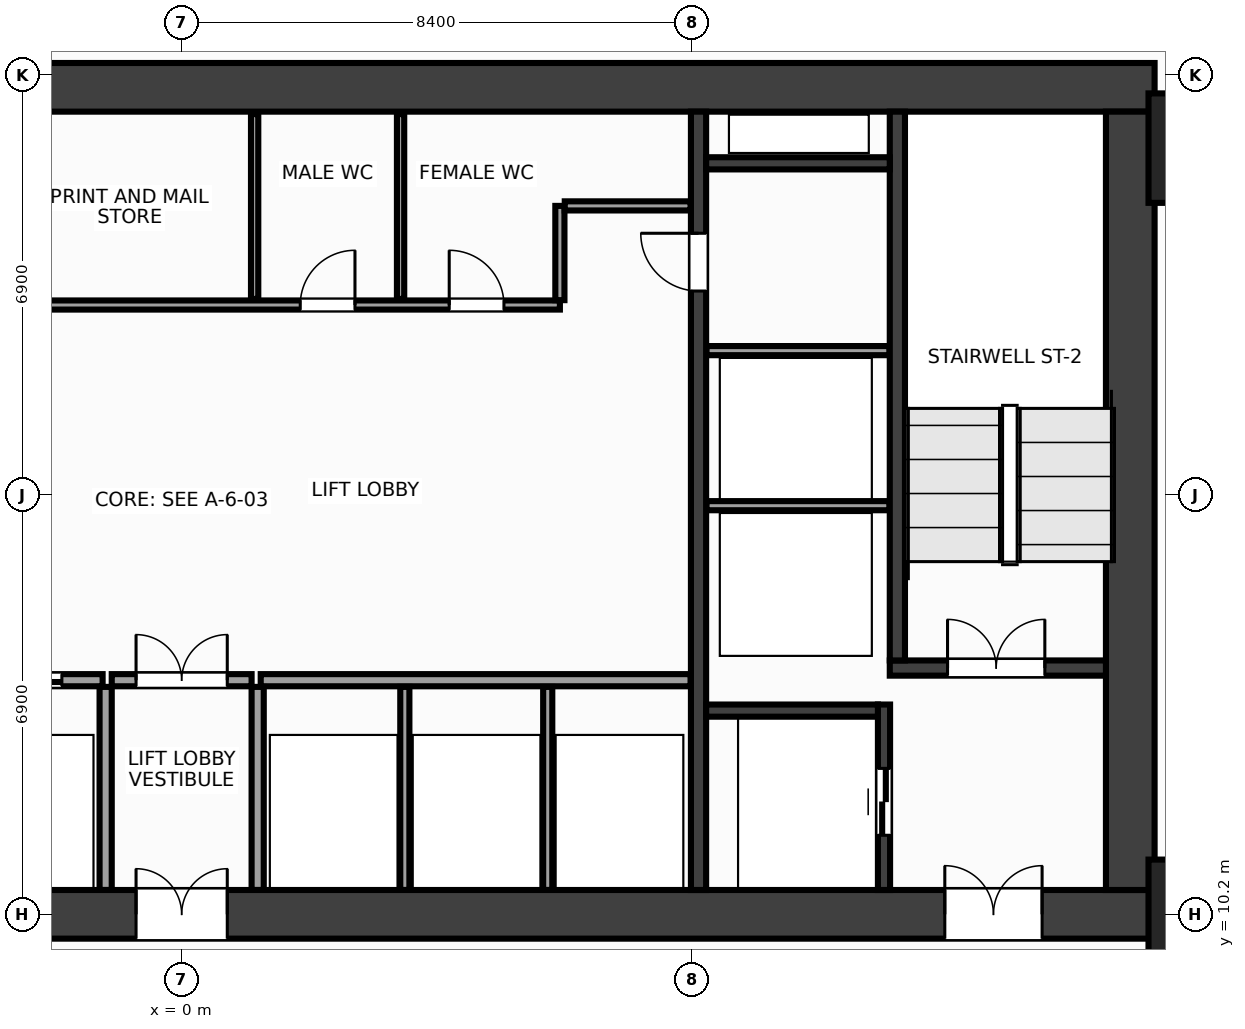
"""IFC4 building model, lengths in metres.
Left out: names, types, materials, properties, quantities, classifications, styles, units other than length and angle.
Written with IfcOpenShell. Run it as: python <this file> out.ifc"""

import sys

from ifc_helpers import new_model, si_unit, direction, frame, frame_2d, origin, origin_2d, place, context, subcontext, project, spatial, rectangle, extrude, source, transform, mapped, element, fill, save


model = new_model("IFC4")
c1 = context("Model", 3, precision=1e-05, world=origin(), true_north=direction((0.0, 1.0)))
c2 = subcontext(c1, "Body", "Model", "MODEL_VIEW")
j1 = project(units=[si_unit("LENGTHUNIT", "METRE"), si_unit("PLANEANGLEUNIT", "RADIAN")], contexts=[c1])
p1 = place(None, origin())
s1 = spatial("IfcSite", under=j1, at=p1, CompositionType="ELEMENT")
p2 = place(p1, origin())
s2 = spatial("IfcBuilding", under=s1, at=p2, CompositionType="ELEMENT")
p3 = place(p2, frame((0.0, 0.0, 48.8)))
s3 = spatial("IfcBuildingStorey", under=s2, at=p3, CompositionType="ELEMENT", Elevation=48.8)
m1 = source(origin(), c2, "Body", "SweptSolid", [
    extrude(rectangle(XDim=32.0, YDim=0.8, at=frame_2d((16.0, 0.0))), origin(), (0.0, 0.0, 1.0), 3.6),
])
p4 = place(p3, frame((-16.0, 23.8, 0.0), z_axis=(0.0, 0.0, 1.0), x_axis=(1.0, 0.0, 0.0)))
e1 = element("IfcWall", 1, at=p4, inside=s3, PredefinedType="SHEAR", context=c2, shape_type="MappedRepresentation", body=[
    mapped(m1, transform((0.0, 0.0, 0.0), x_axis=(1.0, 0.0, 0.0), y_axis=(0.0, 1.0, 0.0), z_axis=(0.0, 0.0, 1.0), scale=1.0)),
])
p5 = place(p3, frame((-16.0, 10.2, 0.0), z_axis=(0.0, 0.0, 1.0), x_axis=(1.0, 0.0, 0.0)))
e2 = element("IfcWall", 2, at=p5, inside=s3, PredefinedType="SHEAR", context=c2, shape_type="MappedRepresentation", body=[
    mapped(m1, transform((0.0, 0.0, 0.0), x_axis=(1.0, 0.0, 0.0), y_axis=(0.0, 1.0, 0.0), z_axis=(0.0, 0.0, 1.0), scale=1.0)),
])
p6 = place(p5, frame((1.85, 0.0, 0.0)))
e3 = element("IfcOpeningElement", 3, at=p6, cuts=e2, PredefinedType="OPENING", context=c2, shape_type="SweptSolid", body=[
    extrude(rectangle(XDim=1.6, YDim=2.15, at=frame_2d((0.8, 1.075))), frame((0.0, 0.412, 0.0), z_axis=(0.0, -1.0, 0.0), x_axis=(1.0, 0.0, 0.0)), (0.0, 0.0, 1.0), 0.824),
])
p7 = place(p5, frame((28.55, 0.0, 0.0)))
e4 = element("IfcOpeningElement", 4, at=p7, cuts=e2, PredefinedType="OPENING", context=c2, shape_type="SweptSolid", body=[
    extrude(rectangle(XDim=1.6, YDim=2.15, at=frame_2d((0.8, 1.075))), frame((0.0, 0.412, 0.0), z_axis=(0.0, -1.0, 0.0), x_axis=(1.0, 0.0, 0.0)), (0.0, 0.0, 1.0), 0.824),
])
p8 = place(p5, frame((15.25, 0.0, 0.0)))
e5 = element("IfcOpeningElement", 5, at=p8, cuts=e2, PredefinedType="OPENING", context=c2, shape_type="SweptSolid", body=[
    extrude(rectangle(XDim=1.5, YDim=2.2, at=frame_2d((0.75, 1.1))), frame((0.0, 0.412, 0.0), z_axis=(0.0, -1.0, 0.0), x_axis=(1.0, 0.0, 0.0)), (0.0, 0.0, 1.0), 0.824),
])
m2 = source(origin(), c2, "Body", "SweptSolid", [
    extrude(rectangle(XDim=12.8, YDim=0.8, at=frame_2d((6.4, 0.0))), origin(), (0.0, 0.0, 1.0), 3.6),
])
p9 = place(p3, frame((15.6, 10.6, 0.0), z_axis=(0.0, 0.0, 1.0), x_axis=(0.0, 1.0, 0.0)))
e6 = element("IfcWall", 6, at=p9, inside=s3, PredefinedType="SHEAR", context=c2, shape_type="MappedRepresentation", body=[
    mapped(m2, transform((0.0, 0.0, 0.0), x_axis=(1.0, 0.0, 0.0), y_axis=(0.0, 1.0, 0.0), z_axis=(0.0, 0.0, 1.0), scale=1.0)),
])
m3 = source(origin(), c2, "Body", "SweptSolid", [
    extrude(rectangle(XDim=12.8, YDim=0.25, at=frame_2d((6.4, 0.0))), origin(), (0.0, 0.0, 1.0), 3.6),
])
p10 = place(p3, frame((8.5, 10.6, 0.0), z_axis=(0.0, 0.0, 1.0), x_axis=(0.0, 1.0, 0.0)))
e7 = element("IfcWall", 7, at=p10, inside=s3, PredefinedType="SHEAR", context=c2, shape_type="MappedRepresentation", body=[
    mapped(m3, transform((0.0, 0.0, 0.0), x_axis=(1.0, 0.0, 0.0), y_axis=(0.0, 1.0, 0.0), z_axis=(0.0, 0.0, 1.0), scale=1.0)),
])
p11 = place(p10, frame((9.85, 0.0, 0.0)))
e8 = element("IfcOpeningElement", 8, at=p11, cuts=e7, PredefinedType="OPENING", context=c2, shape_type="SweptSolid", body=[
    extrude(rectangle(XDim=0.95, YDim=2.15, at=frame_2d((0.475, 1.075))), frame((0.0, 0.137, 0.0), z_axis=(0.0, -1.0, 0.0), x_axis=(1.0, 0.0, 0.0)), (0.0, 0.0, 1.0), 0.274),
])
m4 = source(origin(), c2, "Body", "SweptSolid", [
    extrude(rectangle(XDim=3.555, YDim=0.25, at=frame_2d((1.777, 0.0))), origin(), (0.0, 0.0, 1.0), 3.6),
])
p12 = place(p3, frame((11.645, 14.25, 0.0), z_axis=(0.0, 0.0, 1.0), x_axis=(1.0, 0.0, 0.0)))
e9 = element("IfcWall", 9, at=p12, inside=s3, PredefinedType="SHEAR", context=c2, shape_type="MappedRepresentation", body=[
    mapped(m4, transform((0.0, 0.0, 0.0), x_axis=(1.0, 0.0, 0.0), y_axis=(0.0, 1.0, 0.0), z_axis=(0.0, 0.0, 1.0), scale=1.0)),
])
p13 = place(p12, frame((0.95, 0.0, 0.0)))
e10 = element("IfcOpeningElement", 10, at=p13, cuts=e9, PredefinedType="OPENING", context=c2, shape_type="SweptSolid", body=[
    extrude(rectangle(XDim=1.6, YDim=2.15, at=frame_2d((0.8, 1.075))), frame((0.0, 0.137, 0.0), z_axis=(0.0, -1.0, 0.0), x_axis=(1.0, 0.0, 0.0)), (0.0, 0.0, 1.0), 0.274),
])
m5 = source(origin(), c2, "Body", "SweptSolid", [
    extrude(rectangle(XDim=9.025, YDim=0.25, at=frame_2d((4.512, 0.0))), origin(), (0.0, 0.0, 1.0), 3.6),
])
p14 = place(p3, frame((11.77, 14.375, 0.0), z_axis=(0.0, 0.0, 1.0), x_axis=(0.0, 1.0, 0.0)))
e11 = element("IfcWall", 11, at=p14, inside=s3, PredefinedType="SHEAR", context=c2, shape_type="MappedRepresentation", body=[
    mapped(m5, transform((0.0, 0.0, 0.0), x_axis=(1.0, 0.0, 0.0), y_axis=(0.0, 1.0, 0.0), z_axis=(0.0, 0.0, 1.0), scale=1.0)),
])
m6 = source(origin(), c2, "Body", "SweptSolid", [
    extrude(rectangle(XDim=3.05, YDim=0.2, at=frame_2d((1.525, 0.0))), origin(), (0.0, 0.0, 1.0), 3.6),
])
p15 = place(p3, frame((11.55, 10.6, 0.0), z_axis=(0.0, 0.0, 1.0), x_axis=(0.0, 1.0, 0.0)))
e12 = element("IfcWall", 12, at=p15, inside=s3, PredefinedType="SHEAR", context=c2, shape_type="MappedRepresentation", body=[
    mapped(m6, transform((0.0, 0.0, 0.0), x_axis=(1.0, 0.0, 0.0), y_axis=(0.0, 1.0, 0.0), z_axis=(0.0, 0.0, 1.0), scale=1.0)),
])
p16 = place(p15, frame((0.9, 0.0, 0.0)))
e13 = element("IfcOpeningElement", 13, at=p16, cuts=e12, PredefinedType="OPENING", context=c2, shape_type="SweptSolid", body=[
    extrude(rectangle(XDim=1.1, YDim=2.15, at=frame_2d((0.55, 1.075))), frame((0.0, 0.112, 0.0), z_axis=(0.0, -1.0, 0.0), x_axis=(1.0, 0.0, 0.0)), (0.0, 0.0, 1.0), 0.224),
])
m7 = source(origin(), c2, "Body", "SweptSolid", [
    extrude(rectangle(XDim=2.825, YDim=0.2, at=frame_2d((1.413, 0.0))), origin(), (0.0, 0.0, 1.0), 3.6),
])
p17 = place(p3, frame((8.625, 13.55, 0.0), z_axis=(0.0, 0.0, 1.0), x_axis=(1.0, 0.0, 0.0)))
e14 = element("IfcWall", 14, at=p17, inside=s3, PredefinedType="SHEAR", context=c2, shape_type="MappedRepresentation", body=[
    mapped(m7, transform((0.0, 0.0, 0.0), x_axis=(1.0, 0.0, 0.0), y_axis=(0.0, 1.0, 0.0), z_axis=(0.0, 0.0, 1.0), scale=1.0)),
])
m8 = source(origin(), c2, "Body", "SweptSolid", [
    extrude(rectangle(XDim=3.02, YDim=0.2, at=frame_2d((1.51, 0.0))), origin(), (0.0, 0.0, 1.0), 3.6),
])
p18 = place(p3, frame((8.625, 22.55, 0.0), z_axis=(0.0, 0.0, 1.0), x_axis=(1.0, 0.0, 0.0)))
e15 = element("IfcWall", 15, at=p18, inside=s3, PredefinedType="SHEAR", context=c2, shape_type="MappedRepresentation", body=[
    mapped(m8, transform((0.0, 0.0, 0.0), x_axis=(1.0, 0.0, 0.0), y_axis=(0.0, 1.0, 0.0), z_axis=(0.0, 0.0, 1.0), scale=1.0)),
])
m9 = source(origin(), c2, "Body", "SweptSolid", [
    extrude(rectangle(XDim=1.8, YDim=1.8, at=origin_2d()), origin(), (0.0, 0.0, 1.0), 3.6),
])
for number, where, z_axis, x_axis in (
    (16, (16.8, 10.2, 0.0), (0.0, 0.0, 1.0), (1.0, 0.0, 0.0)),
    (17, (16.8, 22.8, 0.0), (0.0, 0.0, 1.0), (1.0, 0.0, 0.0)),
):
    element("IfcColumn", number, at=place(p3, frame(where, z_axis=z_axis, x_axis=x_axis)), inside=s3, PredefinedType="COLUMN", context=c2, shape_type="MappedRepresentation", body=[
        mapped(m9, transform((0.0, 0.0, 0.0), x_axis=(1.0, 0.0, 0.0), y_axis=(0.0, 1.0, 0.0), z_axis=(0.0, 0.0, 1.0), scale=1.0)),
    ])
m10 = source(origin(), c2, "Body", "SweptSolid", [
    extrude(rectangle(XDim=3.01, YDim=0.15, at=frame_2d((1.505, 0.0))), origin(), (0.0, 0.0, 1.0), 3.36),
])
for number, where, z_axis, x_axis in (
    (18, (8.63, 16.92, 0.0), (0.0, 0.0, 1.0), (1.0, 0.0, 0.0)),
    (19, (8.63, 19.47, 0.0), (0.0, 0.0, 1.0), (1.0, 0.0, 0.0)),
):
    element("IfcWall", number, at=place(p3, frame(where, z_axis=z_axis, x_axis=x_axis)), inside=s3, PredefinedType="PARTITIONING", context=c2, shape_type="MappedRepresentation", body=[
        mapped(m10, transform((0.0, 0.0, 0.0), x_axis=(1.0, 0.0, 0.0), y_axis=(0.0, 1.0, 0.0), z_axis=(0.0, 0.0, 1.0), scale=1.0)),
    ])
m11 = source(origin(), c2, "Body", "SweptSolid", [
    extrude(rectangle(XDim=7.07, YDim=0.2, at=frame_2d((3.535, 0.0))), origin(), (0.0, 0.0, 1.0), 3.36),
])
p19 = place(p3, frame((-8.37, 14.05, 0.0), z_axis=(0.0, 0.0, 1.0), x_axis=(1.0, 0.0, 0.0)))
e20 = element("IfcWall", 20, at=p19, inside=s3, PredefinedType="PARTITIONING", context=c2, shape_type="MappedRepresentation", body=[
    mapped(m11, transform((0.0, 0.0, 0.0), x_axis=(1.0, 0.0, 0.0), y_axis=(0.0, 1.0, 0.0), z_axis=(0.0, 0.0, 1.0), scale=1.0)),
])
p20 = place(p19, frame((0.6, 0.0, 0.0)))
e21 = element("IfcOpeningElement", 21, at=p20, cuts=e20, PredefinedType="OPENING", context=c2, shape_type="SweptSolid", body=[
    extrude(rectangle(XDim=1.1, YDim=2.15, at=frame_2d((0.55, 1.075))), frame((0.0, 0.112, 0.0), z_axis=(0.0, -1.0, 0.0), x_axis=(1.0, 0.0, 0.0)), (0.0, 0.0, 1.0), 0.224),
])
p21 = place(p19, frame((2.95, 0.0, 0.0)))
e22 = element("IfcOpeningElement", 22, at=p21, cuts=e20, PredefinedType="OPENING", context=c2, shape_type="SweptSolid", body=[
    extrude(rectangle(XDim=1.1, YDim=2.15, at=frame_2d((0.55, 1.075))), frame((0.0, 0.112, 0.0), z_axis=(0.0, -1.0, 0.0), x_axis=(1.0, 0.0, 0.0)), (0.0, 0.0, 1.0), 0.224),
])
p22 = place(p19, frame((5.3, 0.0, 0.0)))
e23 = element("IfcOpeningElement", 23, at=p22, cuts=e20, PredefinedType="OPENING", context=c2, shape_type="SweptSolid", body=[
    extrude(rectangle(XDim=1.1, YDim=2.15, at=frame_2d((0.55, 1.075))), frame((0.0, 0.112, 0.0), z_axis=(0.0, -1.0, 0.0), x_axis=(1.0, 0.0, 0.0)), (0.0, 0.0, 1.0), 0.224),
])
p23 = place(p3, frame((1.3, 14.05, 0.0), z_axis=(0.0, 0.0, 1.0), x_axis=(1.0, 0.0, 0.0)))
e24 = element("IfcWall", 24, at=p23, inside=s3, PredefinedType="PARTITIONING", context=c2, shape_type="MappedRepresentation", body=[
    mapped(m11, transform((0.0, 0.0, 0.0), x_axis=(1.0, 0.0, 0.0), y_axis=(0.0, 1.0, 0.0), z_axis=(0.0, 0.0, 1.0), scale=1.0)),
])
m12 = source(origin(), c2, "Body", "SweptSolid", [
    extrude(rectangle(XDim=3.34, YDim=0.2, at=frame_2d((1.67, 0.0))), origin(), (0.0, 0.0, 1.0), 3.36),
])
for number, where, z_axis, x_axis in (
    (25, (-1.25, 10.6, 0.0), (0.0, 0.0, 1.0), (0.0, 1.0, 0.0)),
    (26, (1.25, 10.6, 0.0), (0.0, 0.0, 1.0), (0.0, 1.0, 0.0)),
):
    element("IfcWall", number, at=place(p3, frame(where, z_axis=z_axis, x_axis=x_axis)), inside=s3, PredefinedType="PARTITIONING", context=c2, shape_type="MappedRepresentation", body=[
        mapped(m12, transform((0.0, 0.0, 0.0), x_axis=(1.0, 0.0, 0.0), y_axis=(0.0, 1.0, 0.0), z_axis=(0.0, 0.0, 1.0), scale=1.0)),
    ])
m13 = source(origin(), c2, "Body", "SweptSolid", [
    extrude(rectangle(XDim=2.3, YDim=0.2, at=frame_2d((1.15, 0.0))), origin(), (0.0, 0.0, 1.0), 3.36),
])
p24 = place(p3, frame((-1.15, 14.05, 0.0), z_axis=(0.0, 0.0, 1.0), x_axis=(1.0, 0.0, 0.0)))
e27 = element("IfcWall", 27, at=p24, inside=s3, PredefinedType="PARTITIONING", context=c2, shape_type="MappedRepresentation", body=[
    mapped(m13, transform((0.0, 0.0, 0.0), x_axis=(1.0, 0.0, 0.0), y_axis=(0.0, 1.0, 0.0), z_axis=(0.0, 0.0, 1.0), scale=1.0)),
])
p25 = place(p24, frame((0.4, 0.0, 0.0)))
e28 = element("IfcOpeningElement", 28, at=p25, cuts=e27, PredefinedType="OPENING", context=c2, shape_type="SweptSolid", body=[
    extrude(rectangle(XDim=1.5, YDim=2.2, at=frame_2d((0.75, 1.1))), frame((0.0, 0.112, 0.0), z_axis=(0.0, -1.0, 0.0), x_axis=(1.0, 0.0, 0.0)), (0.0, 0.0, 1.0), 0.224),
])
m14 = source(origin(), c2, "Body", "SweptSolid", [
    extrude(rectangle(XDim=14.59, YDim=0.15, at=frame_2d((7.295, 0.0))), origin(), (0.0, 0.0, 1.0), 3.36),
])
p26 = place(p3, frame((-8.37, 20.22, 0.0), z_axis=(0.0, 0.0, 1.0), x_axis=(1.0, 0.0, 0.0)))
e29 = element("IfcWall", 29, at=p26, inside=s3, PredefinedType="PARTITIONING", context=c2, shape_type="MappedRepresentation", body=[
    mapped(m14, transform((0.0, 0.0, 0.0), x_axis=(1.0, 0.0, 0.0), y_axis=(0.0, 1.0, 0.0), z_axis=(0.0, 0.0, 1.0), scale=1.0)),
])
p27 = place(p26, frame((4.36, 0.0, 0.0)))
e30 = element("IfcOpeningElement", 30, at=p27, cuts=e29, PredefinedType="OPENING", context=c2, shape_type="SweptSolid", body=[
    extrude(rectangle(XDim=0.9, YDim=2.15, at=frame_2d((0.45, 1.075))), frame((0.0, 0.087, 0.0), z_axis=(0.0, -1.0, 0.0), x_axis=(1.0, 0.0, 0.0)), (0.0, 0.0, 1.0), 0.174),
])
p28 = place(p26, frame((10.32, 0.0, 0.0)))
e31 = element("IfcOpeningElement", 31, at=p28, cuts=e29, PredefinedType="OPENING", context=c2, shape_type="SweptSolid", body=[
    extrude(rectangle(XDim=0.9, YDim=2.15, at=frame_2d((0.45, 1.075))), frame((0.0, 0.087, 0.0), z_axis=(0.0, -1.0, 0.0), x_axis=(1.0, 0.0, 0.0)), (0.0, 0.0, 1.0), 0.174),
])
p29 = place(p26, frame((12.77, 0.0, 0.0)))
e32 = element("IfcOpeningElement", 32, at=p29, cuts=e29, PredefinedType="OPENING", context=c2, shape_type="SweptSolid", body=[
    extrude(rectangle(XDim=0.9, YDim=2.15, at=frame_2d((0.45, 1.075))), frame((0.0, 0.087, 0.0), z_axis=(0.0, -1.0, 0.0), x_axis=(1.0, 0.0, 0.0)), (0.0, 0.0, 1.0), 0.174),
])
m15 = source(origin(), c2, "Body", "SweptSolid", [
    extrude(rectangle(XDim=1.55, YDim=0.15, at=frame_2d((0.775, 0.0))), origin(), (0.0, 0.0, 1.0), 3.36),
])
p30 = place(p3, frame((6.22, 20.3, 0.0), z_axis=(0.0, 0.0, 1.0), x_axis=(0.0, 1.0, 0.0)))
e33 = element("IfcWall", 33, at=p30, inside=s3, PredefinedType="PARTITIONING", context=c2, shape_type="MappedRepresentation", body=[
    mapped(m15, transform((0.0, 0.0, 0.0), x_axis=(1.0, 0.0, 0.0), y_axis=(0.0, 1.0, 0.0), z_axis=(0.0, 0.0, 1.0), scale=1.0)),
])
m16 = source(origin(), c2, "Body", "SweptSolid", [
    extrude(rectangle(XDim=2.07, YDim=0.15, at=frame_2d((1.035, 0.0))), origin(), (0.0, 0.0, 1.0), 3.36),
])
p31 = place(p3, frame((6.3, 21.85, 0.0), z_axis=(0.0, 0.0, 1.0), x_axis=(1.0, 0.0, 0.0)))
e34 = element("IfcWall", 34, at=p31, inside=s3, PredefinedType="PARTITIONING", context=c2, shape_type="MappedRepresentation", body=[
    mapped(m16, transform((0.0, 0.0, 0.0), x_axis=(1.0, 0.0, 0.0), y_axis=(0.0, 1.0, 0.0), z_axis=(0.0, 0.0, 1.0), scale=1.0)),
])
m17 = source(origin(), c2, "Body", "SweptSolid", [
    extrude(rectangle(XDim=3.34, YDim=0.15, at=frame_2d((1.67, 0.0))), origin(), (0.0, 0.0, 1.0), 3.36),
])
for number, where, z_axis, x_axis in (
    (35, (3.67, 10.6, 0.0), (0.0, 0.0, 1.0), (0.0, 1.0, 0.0)),
    (36, (6.02, 10.6, 0.0), (0.0, 0.0, 1.0), (0.0, 1.0, 0.0)),
):
    element("IfcWall", number, at=place(p3, frame(where, z_axis=z_axis, x_axis=x_axis)), inside=s3, PredefinedType="PARTITIONING", context=c2, shape_type="MappedRepresentation", body=[
        mapped(m17, transform((0.0, 0.0, 0.0), x_axis=(1.0, 0.0, 0.0), y_axis=(0.0, 1.0, 0.0), z_axis=(0.0, 0.0, 1.0), scale=1.0)),
    ])
m18 = source(origin(), c2, "Body", "SweptSolid", [
    extrude(rectangle(XDim=3.04, YDim=0.12, at=frame_2d((1.52, 0.0))), origin(), (0.0, 0.0, 1.0), 3.36),
])
for number, where, z_axis, x_axis in (
    (37, (1.2, 20.32, 0.0), (0.0, 0.0, 1.0), (0.0, 1.0, 0.0)),
    (38, (3.6, 20.32, 0.0), (0.0, 0.0, 1.0), (0.0, 1.0, 0.0)),
):
    element("IfcWall", number, at=place(p3, frame(where, z_axis=z_axis, x_axis=x_axis)), inside=s3, PredefinedType="PARTITIONING", context=c2, shape_type="MappedRepresentation", body=[
        mapped(m18, transform((0.0, 0.0, 0.0), x_axis=(1.0, 0.0, 0.0), y_axis=(0.0, 1.0, 0.0), z_axis=(0.0, 0.0, 1.0), scale=1.0)),
    ])
m19 = source(origin(), c2, "Body", "SweptSolid", [
    extrude(rectangle(XDim=1.6, YDim=2.15, at=frame_2d((0.8, 1.075))), frame((0.0, 0.025, 0.0), z_axis=(0.0, -1.0, 0.0), x_axis=(1.0, 0.0, 0.0)), (0.0, 0.0, 1.0), 0.05),
])
p32 = place(p13, origin())
e39 = element("IfcDoor", 39, at=p32, inside=s3, OperationType="DOUBLE_DOOR_SINGLE_SWING", PredefinedType="DOOR", context=c2, shape_type="MappedRepresentation", body=[
    mapped(m19, transform((0.0, 0.0, 0.0), x_axis=(1.0, 0.0, 0.0), y_axis=(0.0, 1.0, 0.0), z_axis=(0.0, 0.0, 1.0), scale=1.0)),
])
fill(e10, e39)
p33 = place(p7, origin())
e40 = element("IfcDoor", 40, at=p33, inside=s3, OperationType="DOUBLE_DOOR_SINGLE_SWING", PredefinedType="DOOR", context=c2, shape_type="MappedRepresentation", body=[
    mapped(m19, transform((0.0, 0.0, 0.0), x_axis=(1.0, 0.0, 0.0), y_axis=(0.0, 1.0, 0.0), z_axis=(0.0, 0.0, 1.0), scale=1.0)),
])
fill(e4, e40)
m20 = source(origin(), c2, "Body", "SweptSolid", [
    extrude(rectangle(XDim=1.1, YDim=2.15, at=frame_2d((0.55, 1.075))), frame((0.0, 0.025, 0.0), z_axis=(0.0, -1.0, 0.0), x_axis=(1.0, 0.0, 0.0)), (0.0, 0.0, 1.0), 0.05),
])
p34 = place(p16, origin())
e41 = element("IfcDoor", 41, at=p34, inside=s3, OperationType="DOUBLE_DOOR_SLIDING", PredefinedType="DOOR", context=c2, shape_type="MappedRepresentation", body=[
    mapped(m20, transform((0.0, 0.0, 0.0), x_axis=(1.0, 0.0, 0.0), y_axis=(0.0, 1.0, 0.0), z_axis=(0.0, 0.0, 1.0), scale=1.0)),
])
fill(e13, e41)
m21 = source(origin(), c2, "Body", "SweptSolid", [
    extrude(rectangle(XDim=0.95, YDim=2.15, at=frame_2d((0.475, 1.075))), frame((0.0, 0.025, 0.0), z_axis=(0.0, -1.0, 0.0), x_axis=(1.0, 0.0, 0.0)), (0.0, 0.0, 1.0), 0.05),
])
p35 = place(p11, origin())
e42 = element("IfcDoor", 42, at=p35, inside=s3, OperationType="SINGLE_SWING_RIGHT", PredefinedType="DOOR", context=c2, shape_type="MappedRepresentation", body=[
    mapped(m21, transform((0.0, 0.0, 0.0), x_axis=(1.0, 0.0, 0.0), y_axis=(0.0, 1.0, 0.0), z_axis=(0.0, 0.0, 1.0), scale=1.0)),
])
fill(e8, e42)
p36 = place(p22, origin())
e43 = element("IfcDoor", 43, at=p36, inside=s3, OperationType="DOUBLE_DOOR_SLIDING", PredefinedType="DOOR", context=c2, shape_type="MappedRepresentation", body=[
    mapped(m20, transform((0.0, 0.0, 0.0), x_axis=(1.0, 0.0, 0.0), y_axis=(0.0, 1.0, 0.0), z_axis=(0.0, 0.0, 1.0), scale=1.0)),
])
fill(e23, e43)
m22 = source(origin(), c2, "Body", "SweptSolid", [
    extrude(rectangle(XDim=1.5, YDim=2.2, at=frame_2d((0.75, 1.1))), frame((0.0, 0.025, 0.0), z_axis=(0.0, -1.0, 0.0), x_axis=(1.0, 0.0, 0.0)), (0.0, 0.0, 1.0), 0.05),
])
p37 = place(p25, origin())
e44 = element("IfcDoor", 44, at=p37, inside=s3, OperationType="DOUBLE_DOOR_SINGLE_SWING", PredefinedType="DOOR", context=c2, shape_type="MappedRepresentation", body=[
    mapped(m22, transform((0.0, 0.0, 0.0), x_axis=(1.0, 0.0, 0.0), y_axis=(0.0, 1.0, 0.0), z_axis=(0.0, 0.0, 1.0), scale=1.0)),
])
fill(e28, e44)
p38 = place(p8, origin())
e45 = element("IfcDoor", 45, at=p38, inside=s3, OperationType="DOUBLE_DOOR_SINGLE_SWING", PredefinedType="DOOR", context=c2, shape_type="MappedRepresentation", body=[
    mapped(m22, transform((0.0, 0.0, 0.0), x_axis=(1.0, 0.0, 0.0), y_axis=(0.0, 1.0, 0.0), z_axis=(0.0, 0.0, 1.0), scale=1.0)),
])
fill(e5, e45)
m23 = source(origin(), c2, "Body", "SweptSolid", [
    extrude(rectangle(XDim=0.9, YDim=2.15, at=frame_2d((0.45, 1.075))), frame((0.0, 0.025, 0.0), z_axis=(0.0, -1.0, 0.0), x_axis=(1.0, 0.0, 0.0)), (0.0, 0.0, 1.0), 0.05),
])
p39 = place(p28, origin())
e46 = element("IfcDoor", 46, at=p39, inside=s3, OperationType="SINGLE_SWING_RIGHT", PredefinedType="DOOR", context=c2, shape_type="MappedRepresentation", body=[
    mapped(m23, transform((0.0, 0.0, 0.0), x_axis=(1.0, 0.0, 0.0), y_axis=(0.0, 1.0, 0.0), z_axis=(0.0, 0.0, 1.0), scale=1.0)),
])
fill(e31, e46)
p40 = place(p29, origin())
e47 = element("IfcDoor", 47, at=p40, inside=s3, OperationType="SINGLE_SWING_LEFT", PredefinedType="DOOR", context=c2, shape_type="MappedRepresentation", body=[
    mapped(m23, transform((0.0, 0.0, 0.0), x_axis=(1.0, 0.0, 0.0), y_axis=(0.0, 1.0, 0.0), z_axis=(0.0, 0.0, 1.0), scale=1.0)),
])
fill(e32, e47)
save(model, sys.argv[1])
